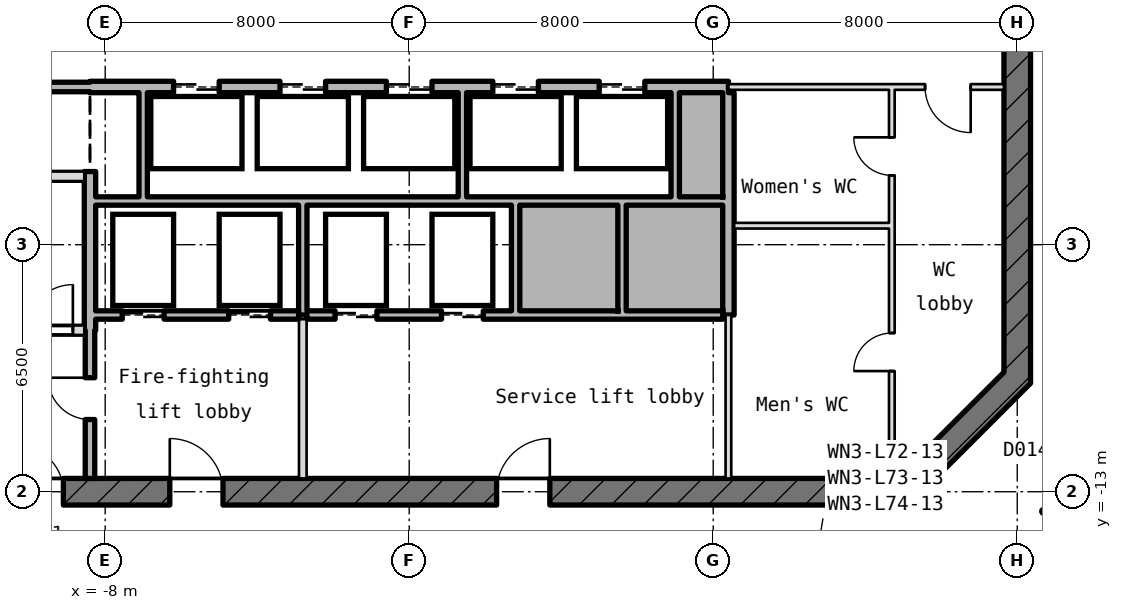
"""IFC4 building model, lengths in metres.
Left out: names, types, materials, properties, quantities, classifications, styles, units other than length and angle.
Written with IfcOpenShell. Run it as: python <this file> out.ifc"""

import sys

from ifc_helpers import new_model, si_unit, direction, frame, frame_2d, origin, place, context, subcontext, project, spatial, rectangle, extrude, element, fill, save


model = new_model("IFC4")
c1 = context("Model", 3, precision=1e-05, world=origin(), true_north=direction((0.0, 1.0)))
c2 = subcontext(c1, "Body", "Model", "MODEL_VIEW")
j1 = project(units=[si_unit("LENGTHUNIT", "METRE"), si_unit("PLANEANGLEUNIT", "RADIAN")], contexts=[c1])
p1 = place(None, origin())
s1 = spatial("IfcSite", under=j1, at=p1, CompositionType="ELEMENT")
p2 = place(p1, origin())
s2 = spatial("IfcBuilding", under=s1, at=p2, CompositionType="ELEMENT")
p3 = place(p2, frame((0.0, 0.0, 321.85)))
s3 = spatial("IfcBuildingStorey", under=s2, at=p3, CompositionType="ELEMENT", Elevation=321.85)
p4 = place(p3, frame((12.897, -13.103, -0.18), z_axis=(0.0, 0.0, 1.0), x_axis=(0.707106781187, 0.707106781187, 0.0)))
e1 = element("IfcWall", 1, at=p4, inside=s3, PredefinedType="SHEAR", context=c2, shape_type="SweptSolid", body=[
    extrude(rectangle(XDim=4.533, YDim=0.7, at=frame_2d((2.266, 0.0))), origin(), (0.0, 0.0, 1.0), 4.15),
])
p5 = place(p3, frame((16.0, -10.145, -0.18), z_axis=(0.0, 0.0, 1.0), x_axis=(0.0, 1.0, 0.0)))
e2 = element("IfcWall", 2, at=p5, inside=s3, PredefinedType="SHEAR", context=c2, shape_type="SweptSolid", body=[
    extrude(rectangle(XDim=20.29, YDim=0.7, at=frame_2d((10.145, 0.0))), origin(), (0.0, 0.0, 1.0), 4.15),
])
p6 = place(p5, frame((8.945, 0.0, 0.18)))
e3 = element("IfcOpeningElement", 3, at=p6, cuts=e2, PredefinedType="OPENING", context=c2, shape_type="SweptSolid", body=[
    extrude(rectangle(XDim=2.4, YDim=2.1, at=frame_2d((1.2, 1.05))), frame((0.0, 0.36, 0.0), z_axis=(0.0, -1.0, 0.0), x_axis=(1.0, 0.0, 0.0)), (0.0, 0.0, 1.0), 0.72),
])
p7 = place(p5, frame((13.545, 0.0, 0.18)))
e4 = element("IfcOpeningElement", 4, at=p7, cuts=e2, PredefinedType="OPENING", context=c2, shape_type="SweptSolid", body=[
    extrude(rectangle(XDim=1.2, YDim=2.1, at=frame_2d((0.6, 1.05))), frame((0.0, 0.36, 0.0), z_axis=(0.0, -1.0, 0.0), x_axis=(1.0, 0.0, 0.0)), (0.0, 0.0, 1.0), 0.72),
])
p8 = place(p3, frame((-13.145, -13.0, -0.18), z_axis=(0.0, 0.0, 1.0), x_axis=(1.0, 0.0, 0.0)))
e5 = element("IfcWall", 5, at=p8, inside=s3, PredefinedType="SHEAR", context=c2, shape_type="SweptSolid", body=[
    extrude(rectangle(XDim=26.29, YDim=0.7, at=frame_2d((13.145, 0.0))), origin(), (0.0, 0.0, 1.0), 4.15),
])
p9 = place(p8, frame((2.845, 0.0, 0.18)))
e6 = element("IfcOpeningElement", 6, at=p9, cuts=e5, PredefinedType="OPENING", context=c2, shape_type="SweptSolid", body=[
    extrude(rectangle(XDim=1.2, YDim=2.1, at=frame_2d((0.6, 1.05))), frame((0.0, 0.36, 0.0), z_axis=(0.0, -1.0, 0.0), x_axis=(1.0, 0.0, 0.0)), (0.0, 0.0, 1.0), 0.72),
])
p10 = place(p8, frame((6.845, 0.0, 0.18)))
e7 = element("IfcOpeningElement", 7, at=p10, cuts=e5, PredefinedType="OPENING", context=c2, shape_type="SweptSolid", body=[
    extrude(rectangle(XDim=1.4, YDim=2.1, at=frame_2d((0.7, 1.05))), frame((0.0, 0.36, 0.0), z_axis=(0.0, -1.0, 0.0), x_axis=(1.0, 0.0, 0.0)), (0.0, 0.0, 1.0), 0.72),
])
p11 = place(p8, frame((15.445, 0.0, 0.18)))
e8 = element("IfcOpeningElement", 8, at=p11, cuts=e5, PredefinedType="OPENING", context=c2, shape_type="SweptSolid", body=[
    extrude(rectangle(XDim=1.4, YDim=2.1, at=frame_2d((0.7, 1.05))), frame((0.0, 0.36, 0.0), z_axis=(0.0, -1.0, 0.0), x_axis=(1.0, 0.0, 0.0)), (0.0, 0.0, 1.0), 0.72),
])
p12 = place(p3, frame((-15.65, -8.75, -0.18), z_axis=(0.0, 0.0, 1.0), x_axis=(1.0, 0.0, 0.0)))
e9 = element("IfcWall", 9, at=p12, inside=s3, PredefinedType="SHEAR", context=c2, shape_type="SweptSolid", body=[
    extrude(rectangle(XDim=7.1, YDim=0.25, at=frame_2d((3.55, 0.0))), origin(), (0.0, 0.0, 1.0), 4.15),
])
p13 = place(p12, frame((5.6, 0.0, 0.18)))
e10 = element("IfcOpeningElement", 10, at=p13, cuts=e9, PredefinedType="OPENING", context=c2, shape_type="SweptSolid", body=[
    extrude(rectangle(XDim=1.2, YDim=2.1, at=frame_2d((0.6, 1.05))), frame((0.0, 0.135, 0.0), z_axis=(0.0, -1.0, 0.0), x_axis=(1.0, 0.0, 0.0)), (0.0, 0.0, 1.0), 0.27),
])
p14 = place(p3, frame((-8.25, -8.35, 0.0), z_axis=(0.0, 0.0, 1.0), x_axis=(1.0, 0.0, 0.0)))
e11 = element("IfcWall", 11, at=p14, inside=s3, PredefinedType="STANDARD", context=c2, shape_type="SweptSolid", body=[
    extrude(rectangle(XDim=5.34, YDim=0.22, at=frame_2d((2.67, 0.0))), origin(), (0.0, 0.0, 1.0), 3.97),
])
p15 = place(p14, frame((0.7, 0.0, 0.0)))
e12 = element("IfcOpeningElement", 12, at=p15, cuts=e11, PredefinedType="OPENING", context=c2, shape_type="SweptSolid", body=[
    extrude(rectangle(XDim=1.1, YDim=2.1, at=frame_2d((0.55, 1.05))), frame((0.0, 0.12, 0.0), z_axis=(0.0, -1.0, 0.0), x_axis=(1.0, 0.0, 0.0)), (0.0, 0.0, 1.0), 0.24),
])
p16 = place(p14, frame((3.5, 0.0, 0.0)))
e13 = element("IfcOpeningElement", 13, at=p16, cuts=e11, PredefinedType="OPENING", context=c2, shape_type="SweptSolid", body=[
    extrude(rectangle(XDim=1.1, YDim=2.1, at=frame_2d((0.55, 1.05))), frame((0.0, 0.12, 0.0), z_axis=(0.0, -1.0, 0.0), x_axis=(1.0, 0.0, 0.0)), (0.0, 0.0, 1.0), 0.24),
])
p17 = place(p3, frame((-2.69, -8.35, 0.0), z_axis=(0.0, 0.0, 1.0), x_axis=(1.0, 0.0, 0.0)))
e14 = element("IfcWall", 14, at=p17, inside=s3, PredefinedType="STANDARD", context=c2, shape_type="SweptSolid", body=[
    extrude(rectangle(XDim=10.94, YDim=0.22, at=frame_2d((5.47, 0.0))), origin(), (0.0, 0.0, 1.0), 3.97),
])
p18 = place(p17, frame((0.74, 0.0, 0.0)))
e15 = element("IfcOpeningElement", 15, at=p18, cuts=e14, PredefinedType="OPENING", context=c2, shape_type="SweptSolid", body=[
    extrude(rectangle(XDim=1.1, YDim=2.1, at=frame_2d((0.55, 1.05))), frame((0.0, 0.12, 0.0), z_axis=(0.0, -1.0, 0.0), x_axis=(1.0, 0.0, 0.0)), (0.0, 0.0, 1.0), 0.24),
])
p19 = place(p17, frame((3.54, 0.0, 0.0)))
e16 = element("IfcOpeningElement", 16, at=p19, cuts=e14, PredefinedType="OPENING", context=c2, shape_type="SweptSolid", body=[
    extrude(rectangle(XDim=1.1, YDim=2.1, at=frame_2d((0.55, 1.05))), frame((0.0, 0.12, 0.0), z_axis=(0.0, -1.0, 0.0), x_axis=(1.0, 0.0, 0.0)), (0.0, 0.0, 1.0), 0.24),
])
p20 = place(p3, frame((8.55, -6.0, 0.0), z_axis=(0.0, 0.0, 1.0), x_axis=(1.0, 0.0, 0.0)))
e17 = element("IfcWall", 17, at=p20, inside=s3, PredefinedType="PARTITIONING", context=c2, shape_type="SweptSolid", body=[
    extrude(rectangle(XDim=4.075, YDim=0.15, at=frame_2d((2.038, 0.0))), origin(), (0.0, 0.0, 1.0), 3.97),
])
p21 = place(p3, frame((-8.25, -5.35, 0.0), z_axis=(0.0, 0.0, 1.0), x_axis=(1.0, 0.0, 0.0)))
e18 = element("IfcWall", 18, at=p21, inside=s3, PredefinedType="STANDARD", context=c2, shape_type="SweptSolid", body=[
    extrude(rectangle(XDim=16.5, YDim=0.22, at=frame_2d((8.25, 0.0))), origin(), (0.0, 0.0, 1.0), 3.97),
])
p22 = place(p3, frame((-15.65, -4.7, -0.18), z_axis=(0.0, 0.0, 1.0), x_axis=(1.0, 0.0, 0.0)))
e19 = element("IfcWall", 19, at=p22, inside=s3, PredefinedType="SHEAR", context=c2, shape_type="SweptSolid", body=[
    extrude(rectangle(XDim=7.1, YDim=0.25, at=frame_2d((3.55, 0.0))), origin(), (0.0, 0.0, 1.0), 4.15),
])
p23 = place(p3, frame((-15.65, -2.35, 0.0), z_axis=(0.0, 0.0, 1.0), x_axis=(1.0, 0.0, 0.0)))
e20 = element("IfcWall", 20, at=p23, inside=s3, PredefinedType="STANDARD", context=c2, shape_type="SweptSolid", body=[
    extrude(rectangle(XDim=7.25, YDim=0.25, at=frame_2d((3.625, 0.0))), origin(), (0.0, 0.0, 1.0), 3.97),
])
p24 = place(p3, frame((-8.4, -2.35, -0.18), z_axis=(0.0, 0.0, 1.0), x_axis=(1.0, 0.0, 0.0)))
e21 = element("IfcWall", 21, at=p24, inside=s3, PredefinedType="SHEAR", context=c2, shape_type="SweptSolid", body=[
    extrude(rectangle(XDim=16.8, YDim=0.3, at=frame_2d((8.4, 0.0))), origin(), (0.0, 0.0, 1.0), 4.15),
])
p25 = place(p24, frame((2.2, 0.0, 0.18)))
e22 = element("IfcOpeningElement", 22, at=p25, cuts=e21, PredefinedType="OPENING", context=c2, shape_type="SweptSolid", body=[
    extrude(rectangle(XDim=1.2, YDim=2.1, at=frame_2d((0.6, 1.05))), frame((0.0, 0.16, 0.0), z_axis=(0.0, -1.0, 0.0), x_axis=(1.0, 0.0, 0.0)), (0.0, 0.0, 1.0), 0.32),
])
p26 = place(p24, frame((5.0, 0.0, 0.18)))
e23 = element("IfcOpeningElement", 23, at=p26, cuts=e21, PredefinedType="OPENING", context=c2, shape_type="SweptSolid", body=[
    extrude(rectangle(XDim=1.2, YDim=2.1, at=frame_2d((0.6, 1.05))), frame((0.0, 0.16, 0.0), z_axis=(0.0, -1.0, 0.0), x_axis=(1.0, 0.0, 0.0)), (0.0, 0.0, 1.0), 0.32),
])
p27 = place(p24, frame((7.8, 0.0, 0.18)))
e24 = element("IfcOpeningElement", 24, at=p27, cuts=e21, PredefinedType="OPENING", context=c2, shape_type="SweptSolid", body=[
    extrude(rectangle(XDim=1.2, YDim=2.1, at=frame_2d((0.6, 1.05))), frame((0.0, 0.16, 0.0), z_axis=(0.0, -1.0, 0.0), x_axis=(1.0, 0.0, 0.0)), (0.0, 0.0, 1.0), 0.32),
])
p28 = place(p24, frame((10.6, 0.0, 0.18)))
e25 = element("IfcOpeningElement", 25, at=p28, cuts=e21, PredefinedType="OPENING", context=c2, shape_type="SweptSolid", body=[
    extrude(rectangle(XDim=1.2, YDim=2.1, at=frame_2d((0.6, 1.05))), frame((0.0, 0.16, 0.0), z_axis=(0.0, -1.0, 0.0), x_axis=(1.0, 0.0, 0.0)), (0.0, 0.0, 1.0), 0.32),
])
p29 = place(p24, frame((13.4, 0.0, 0.18)))
e26 = element("IfcOpeningElement", 26, at=p29, cuts=e21, PredefinedType="OPENING", context=c2, shape_type="SweptSolid", body=[
    extrude(rectangle(XDim=1.2, YDim=2.1, at=frame_2d((0.6, 1.05))), frame((0.0, 0.16, 0.0), z_axis=(0.0, -1.0, 0.0), x_axis=(1.0, 0.0, 0.0)), (0.0, 0.0, 1.0), 0.32),
])
p30 = place(p3, frame((8.4, -2.35, 0.0), z_axis=(0.0, 0.0, 1.0), x_axis=(1.0, 0.0, 0.0)))
e27 = element("IfcWall", 27, at=p30, inside=s3, PredefinedType="PARTITIONING", context=c2, shape_type="SweptSolid", body=[
    extrude(rectangle(XDim=7.25, YDim=0.15, at=frame_2d((3.625, 0.0))), origin(), (0.0, 0.0, 1.0), 3.97),
])
p31 = place(p30, frame((5.175, 0.0, 0.0)))
e28 = element("IfcOpeningElement", 28, at=p31, cuts=e27, PredefinedType="OPENING", context=c2, shape_type="SweptSolid", body=[
    extrude(rectangle(XDim=1.2, YDim=2.1, at=frame_2d((0.6, 1.05))), frame((0.0, 0.085, 0.0), z_axis=(0.0, -1.0, 0.0), x_axis=(1.0, 0.0, 0.0)), (0.0, 0.0, 1.0), 0.17),
])
p32 = place(p3, frame((-8.4, -12.65, 0.0), z_axis=(0.0, 0.0, 1.0), x_axis=(0.0, 1.0, 0.0)))
e29 = element("IfcWall", 29, at=p32, inside=s3, PredefinedType="STANDARD", context=c2, shape_type="SweptSolid", body=[
    extrude(rectangle(XDim=3.9, YDim=0.25, at=frame_2d((1.95, 0.0))), origin(), (0.0, 0.0, 1.0), 3.97),
])
p33 = place(p32, frame((1.55, 0.0, 0.0)))
e30 = element("IfcOpeningElement", 30, at=p33, cuts=e29, PredefinedType="OPENING", context=c2, shape_type="SweptSolid", body=[
    extrude(rectangle(XDim=1.1, YDim=2.1, at=frame_2d((0.55, 1.05))), frame((0.0, 0.135, 0.0), z_axis=(0.0, -1.0, 0.0), x_axis=(1.0, 0.0, 0.0)), (0.0, 0.0, 1.0), 0.27),
])
p34 = place(p3, frame((-8.4, -8.75, -0.18), z_axis=(0.0, 0.0, 1.0), x_axis=(0.0, 1.0, 0.0)))
e31 = element("IfcWall", 31, at=p34, inside=s3, PredefinedType="SHEAR", context=c2, shape_type="SweptSolid", body=[
    extrude(rectangle(XDim=4.175, YDim=0.3, at=frame_2d((2.087, 0.0))), origin(), (0.0, 0.0, 1.0), 4.15),
])
p35 = place(p3, frame((-7.0, -5.24, 0.0), z_axis=(0.0, 0.0, 1.0), x_axis=(0.0, 1.0, 0.0)))
e32 = element("IfcWall", 32, at=p35, inside=s3, PredefinedType="STANDARD", context=c2, shape_type="SweptSolid", body=[
    extrude(rectangle(XDim=2.74, YDim=0.22, at=frame_2d((1.37, 0.0))), origin(), (0.0, 0.0, 1.0), 3.97),
])
p36 = place(p3, frame((-2.8, -12.65, 0.0), z_axis=(0.0, 0.0, 1.0), x_axis=(0.0, 1.0, 0.0)))
e33 = element("IfcWall", 33, at=p36, inside=s3, PredefinedType="PARTITIONING", context=c2, shape_type="SweptSolid", body=[
    extrude(rectangle(XDim=4.19, YDim=0.2, at=frame_2d((2.095, 0.0))), origin(), (0.0, 0.0, 1.0), 3.97),
])
p37 = place(p3, frame((-2.8, -8.35, 0.0), z_axis=(0.0, 0.0, 1.0), x_axis=(0.0, 1.0, 0.0)))
e34 = element("IfcWall", 34, at=p37, inside=s3, PredefinedType="STANDARD", context=c2, shape_type="SweptSolid", body=[
    extrude(rectangle(XDim=2.89, YDim=0.22, at=frame_2d((1.445, 0.0))), origin(), (0.0, 0.0, 1.0), 3.97),
])
p38 = place(p3, frame((1.4, -5.24, 0.0), z_axis=(0.0, 0.0, 1.0), x_axis=(0.0, 1.0, 0.0)))
e35 = element("IfcWall", 35, at=p38, inside=s3, PredefinedType="STANDARD", context=c2, shape_type="SweptSolid", body=[
    extrude(rectangle(XDim=2.74, YDim=0.22, at=frame_2d((1.37, 0.0))), origin(), (0.0, 0.0, 1.0), 3.97),
])
for number, where, z_axis, x_axis in (
    (36, (2.8, -8.24, 0.0), (0.0, 0.0, 1.0), (0.0, 1.0, 0.0)),
    (37, (5.6, -8.24, 0.0), (0.0, 0.0, 1.0), (0.0, 1.0, 0.0)),
):
    element("IfcWall", number, at=place(p3, frame(where, z_axis=z_axis, x_axis=x_axis)), inside=s3, PredefinedType="STANDARD", context=c2, shape_type="SweptSolid", body=[
        extrude(rectangle(XDim=2.78, YDim=0.22, at=frame_2d((1.39, 0.0))), origin(), (0.0, 0.0, 1.0), 3.97),
    ])
p39 = place(p3, frame((7.0, -5.24, 0.0), z_axis=(0.0, 0.0, 1.0), x_axis=(0.0, 1.0, 0.0)))
e38 = element("IfcWall", 38, at=p39, inside=s3, PredefinedType="STANDARD", context=c2, shape_type="SweptSolid", body=[
    extrude(rectangle(XDim=2.74, YDim=0.22, at=frame_2d((1.37, 0.0))), origin(), (0.0, 0.0, 1.0), 3.97),
])
p40 = place(p3, frame((8.4, -12.65, 0.0), z_axis=(0.0, 0.0, 1.0), x_axis=(0.0, 1.0, 0.0)))
e39 = element("IfcWall", 39, at=p40, inside=s3, PredefinedType="PARTITIONING", context=c2, shape_type="SweptSolid", body=[
    extrude(rectangle(XDim=4.3, YDim=0.15, at=frame_2d((2.15, 0.0))), origin(), (0.0, 0.0, 1.0), 3.97),
])
p41 = place(p3, frame((8.4, -8.35, -0.18), z_axis=(0.0, 0.0, 1.0), x_axis=(0.0, 1.0, 0.0)))
e40 = element("IfcWall", 40, at=p41, inside=s3, PredefinedType="SHEAR", context=c2, shape_type="SweptSolid", body=[
    extrude(rectangle(XDim=5.85, YDim=0.3, at=frame_2d((2.925, 0.0))), origin(), (0.0, 0.0, 1.0), 4.15),
])
p42 = place(p3, frame((12.7, -12.65, 0.0), z_axis=(0.0, 0.0, 1.0), x_axis=(0.0, 1.0, 0.0)))
e41 = element("IfcWall", 41, at=p42, inside=s3, PredefinedType="PARTITIONING", context=c2, shape_type="SweptSolid", body=[
    extrude(rectangle(XDim=10.225, YDim=0.15, at=frame_2d((5.112, 0.0))), origin(), (0.0, 0.0, 1.0), 3.97),
])
p43 = place(p42, frame((7.975, 0.0, 0.0)))
e42 = element("IfcOpeningElement", 42, at=p43, cuts=e41, PredefinedType="OPENING", context=c2, shape_type="SweptSolid", body=[
    extrude(rectangle(XDim=1.0, YDim=2.1, at=frame_2d((0.5, 1.05))), frame((0.0, 0.085, 0.0), z_axis=(0.0, -1.0, 0.0), x_axis=(1.0, 0.0, 0.0)), (0.0, 0.0, 1.0), 0.17),
])
p44 = place(p42, frame((2.825, 0.0, 0.0)))
e43 = element("IfcOpeningElement", 43, at=p44, cuts=e41, PredefinedType="OPENING", context=c2, shape_type="SweptSolid", body=[
    extrude(rectangle(XDim=1.0, YDim=2.1, at=frame_2d((0.5, 1.05))), frame((0.0, 0.085, 0.0), z_axis=(0.0, -1.0, 0.0), x_axis=(1.0, 0.0, 0.0)), (0.0, 0.0, 1.0), 0.17),
])
p45 = place(p3, frame((19.05, -11.263, 0.0), z_axis=(0.0, 0.0, 1.0), x_axis=(-0.722587616722, -0.691279347414, 0.0)))
e44 = element("IfcWall", 44, at=p45, inside=s3, PredefinedType="PARTITIONING", context=c2, shape_type="SweptSolid", body=[
    extrude(rectangle(XDim=6.745, YDim=0.15, at=frame_2d((3.373, 0.0))), origin(), (0.0, 0.0, 1.0), 3.97),
])
p46 = place(p45, frame((2.36, 0.0, 0.0)))
e45 = element("IfcOpeningElement", 45, at=p46, cuts=e44, PredefinedType="OPENING", context=c2, shape_type="SweptSolid", body=[
    extrude(rectangle(XDim=1.8, YDim=2.1, at=frame_2d((0.9, 1.05))), frame((0.0, 0.085, 0.0), z_axis=(0.0, -1.0, 0.0), x_axis=(1.0, 0.0, 0.0)), (0.0, 0.0, 1.0), 0.17),
])
p47 = place(p25, origin())
e46 = element("IfcDoor", 46, at=p47, inside=s3, OperationType="DOUBLE_DOOR_SLIDING", PredefinedType="DOOR", context=c2, shape_type="SweptSolid", body=[
    extrude(rectangle(XDim=1.2, YDim=2.1, at=frame_2d((0.6, 1.05))), frame((0.0, 0.025, 0.0), z_axis=(0.0, -1.0, 0.0), x_axis=(1.0, 0.0, 0.0)), (0.0, 0.0, 1.0), 0.05),
])
fill(e22, e46)
p48 = place(p26, origin())
e47 = element("IfcDoor", 47, at=p48, inside=s3, OperationType="DOUBLE_DOOR_SLIDING", PredefinedType="DOOR", context=c2, shape_type="SweptSolid", body=[
    extrude(rectangle(XDim=1.2, YDim=2.1, at=frame_2d((0.6, 1.05))), frame((0.0, 0.025, 0.0), z_axis=(0.0, -1.0, 0.0), x_axis=(1.0, 0.0, 0.0)), (0.0, 0.0, 1.0), 0.05),
])
fill(e23, e47)
p49 = place(p27, origin())
e48 = element("IfcDoor", 48, at=p49, inside=s3, OperationType="DOUBLE_DOOR_SLIDING", PredefinedType="DOOR", context=c2, shape_type="SweptSolid", body=[
    extrude(rectangle(XDim=1.2, YDim=2.1, at=frame_2d((0.6, 1.05))), frame((0.0, 0.025, 0.0), z_axis=(0.0, -1.0, 0.0), x_axis=(1.0, 0.0, 0.0)), (0.0, 0.0, 1.0), 0.05),
])
fill(e24, e48)
p50 = place(p28, origin())
e49 = element("IfcDoor", 49, at=p50, inside=s3, OperationType="DOUBLE_DOOR_SLIDING", PredefinedType="DOOR", context=c2, shape_type="SweptSolid", body=[
    extrude(rectangle(XDim=1.2, YDim=2.1, at=frame_2d((0.6, 1.05))), frame((0.0, 0.025, 0.0), z_axis=(0.0, -1.0, 0.0), x_axis=(1.0, 0.0, 0.0)), (0.0, 0.0, 1.0), 0.05),
])
fill(e25, e49)
p51 = place(p29, origin())
e50 = element("IfcDoor", 50, at=p51, inside=s3, OperationType="DOUBLE_DOOR_SLIDING", PredefinedType="DOOR", context=c2, shape_type="SweptSolid", body=[
    extrude(rectangle(XDim=1.2, YDim=2.1, at=frame_2d((0.6, 1.05))), frame((0.0, 0.025, 0.0), z_axis=(0.0, -1.0, 0.0), x_axis=(1.0, 0.0, 0.0)), (0.0, 0.0, 1.0), 0.05),
])
fill(e26, e50)
p52 = place(p15, origin())
e51 = element("IfcDoor", 51, at=p52, inside=s3, OperationType="DOUBLE_DOOR_SLIDING", PredefinedType="DOOR", context=c2, shape_type="SweptSolid", body=[
    extrude(rectangle(XDim=1.1, YDim=2.1, at=frame_2d((0.55, 1.05))), frame((0.0, 0.025, 0.0), z_axis=(0.0, -1.0, 0.0), x_axis=(1.0, 0.0, 0.0)), (0.0, 0.0, 1.0), 0.05),
])
fill(e12, e51)
p53 = place(p16, origin())
e52 = element("IfcDoor", 52, at=p53, inside=s3, OperationType="DOUBLE_DOOR_SLIDING", PredefinedType="DOOR", context=c2, shape_type="SweptSolid", body=[
    extrude(rectangle(XDim=1.1, YDim=2.1, at=frame_2d((0.55, 1.05))), frame((0.0, 0.025, 0.0), z_axis=(0.0, -1.0, 0.0), x_axis=(1.0, 0.0, 0.0)), (0.0, 0.0, 1.0), 0.05),
])
fill(e13, e52)
p54 = place(p18, origin())
e53 = element("IfcDoor", 53, at=p54, inside=s3, OperationType="DOUBLE_DOOR_SLIDING", PredefinedType="DOOR", context=c2, shape_type="SweptSolid", body=[
    extrude(rectangle(XDim=1.1, YDim=2.1, at=frame_2d((0.55, 1.05))), frame((0.0, 0.025, 0.0), z_axis=(0.0, -1.0, 0.0), x_axis=(1.0, 0.0, 0.0)), (0.0, 0.0, 1.0), 0.05),
])
fill(e15, e53)
p55 = place(p19, origin())
e54 = element("IfcDoor", 54, at=p55, inside=s3, OperationType="DOUBLE_DOOR_SLIDING", PredefinedType="DOOR", context=c2, shape_type="SweptSolid", body=[
    extrude(rectangle(XDim=1.1, YDim=2.1, at=frame_2d((0.55, 1.05))), frame((0.0, 0.025, 0.0), z_axis=(0.0, -1.0, 0.0), x_axis=(1.0, 0.0, 0.0)), (0.0, 0.0, 1.0), 0.05),
])
fill(e16, e54)
p56 = place(p13, origin())
e55 = element("IfcDoor", 55, at=p56, inside=s3, OperationType="SINGLE_SWING_RIGHT", PredefinedType="DOOR", context=c2, shape_type="SweptSolid", body=[
    extrude(rectangle(XDim=1.2, YDim=2.1, at=frame_2d((0.6, 1.05))), frame((0.0, 0.025, 0.0), z_axis=(0.0, -1.0, 0.0), x_axis=(1.0, 0.0, 0.0)), (0.0, 0.0, 1.0), 0.05),
])
fill(e10, e55)
p57 = place(p33, origin())
e56 = element("IfcDoor", 56, at=p57, inside=s3, OperationType="SINGLE_SWING_RIGHT", PredefinedType="DOOR", context=c2, shape_type="SweptSolid", body=[
    extrude(rectangle(XDim=1.1, YDim=2.1, at=frame_2d((0.55, 1.05))), frame((0.0, 0.025, 0.0), z_axis=(0.0, -1.0, 0.0), x_axis=(1.0, 0.0, 0.0)), (0.0, 0.0, 1.0), 0.05),
])
fill(e30, e56)
p58 = place(p9, origin())
e57 = element("IfcDoor", 57, at=p58, inside=s3, OperationType="SINGLE_SWING_RIGHT", PredefinedType="DOOR", context=c2, shape_type="SweptSolid", body=[
    extrude(rectangle(XDim=1.2, YDim=2.1, at=frame_2d((0.6, 1.05))), frame((0.0, 0.025, 0.0), z_axis=(0.0, -1.0, 0.0), x_axis=(1.0, 0.0, 0.0)), (0.0, 0.0, 1.0), 0.05),
])
fill(e6, e57)
p59 = place(p10, origin())
e58 = element("IfcDoor", 58, at=p59, inside=s3, OperationType="SINGLE_SWING_RIGHT", PredefinedType="DOOR", context=c2, shape_type="SweptSolid", body=[
    extrude(rectangle(XDim=1.4, YDim=2.1, at=frame_2d((0.7, 1.05))), frame((0.0, 0.025, 0.0), z_axis=(0.0, -1.0, 0.0), x_axis=(1.0, 0.0, 0.0)), (0.0, 0.0, 1.0), 0.05),
])
fill(e7, e58)
p60 = place(p11, origin())
e59 = element("IfcDoor", 59, at=p60, inside=s3, OperationType="SINGLE_SWING_RIGHT", PredefinedType="DOOR", context=c2, shape_type="SweptSolid", body=[
    extrude(rectangle(XDim=1.4, YDim=2.1, at=frame_2d((0.7, 1.05))), frame((0.0, 0.025, 0.0), z_axis=(0.0, -1.0, 0.0), x_axis=(1.0, 0.0, 0.0)), (0.0, 0.0, 1.0), 0.05),
])
fill(e8, e59)
p61 = place(p31, frame((1.2, 0.0, 0.0), z_axis=(0.0, 0.0, 1.0), x_axis=(-1.0, 0.0, 0.0)))
e60 = element("IfcDoor", 60, at=p61, inside=s3, OperationType="SINGLE_SWING_LEFT", PredefinedType="DOOR", context=c2, shape_type="SweptSolid", body=[
    extrude(rectangle(XDim=1.2, YDim=2.1, at=frame_2d((0.6, 1.05))), frame((0.0, 0.025, 0.0), z_axis=(0.0, -1.0, 0.0), x_axis=(1.0, 0.0, 0.0)), (0.0, 0.0, 1.0), 0.05),
])
fill(e28, e60)
p62 = place(p43, origin())
e61 = element("IfcDoor", 61, at=p62, inside=s3, OperationType="SINGLE_SWING_RIGHT", PredefinedType="DOOR", context=c2, shape_type="SweptSolid", body=[
    extrude(rectangle(XDim=1.0, YDim=2.1, at=frame_2d((0.5, 1.05))), frame((0.0, 0.025, 0.0), z_axis=(0.0, -1.0, 0.0), x_axis=(1.0, 0.0, 0.0)), (0.0, 0.0, 1.0), 0.05),
])
fill(e42, e61)
p63 = place(p44, origin())
e62 = element("IfcDoor", 62, at=p63, inside=s3, OperationType="SINGLE_SWING_RIGHT", PredefinedType="DOOR", context=c2, shape_type="SweptSolid", body=[
    extrude(rectangle(XDim=1.0, YDim=2.1, at=frame_2d((0.5, 1.05))), frame((0.0, 0.025, 0.0), z_axis=(0.0, -1.0, 0.0), x_axis=(1.0, 0.0, 0.0)), (0.0, 0.0, 1.0), 0.05),
])
fill(e43, e62)
p64 = place(p46, origin())
e63 = element("IfcDoor", 63, at=p64, inside=s3, OperationType="DOUBLE_DOOR_SINGLE_SWING", PredefinedType="DOOR", context=c2, shape_type="SweptSolid", body=[
    extrude(rectangle(XDim=1.8, YDim=2.1, at=frame_2d((0.9, 1.05))), frame((0.0, 0.025, 0.0), z_axis=(0.0, -1.0, 0.0), x_axis=(1.0, 0.0, 0.0)), (0.0, 0.0, 1.0), 0.05),
])
fill(e45, e63)
save(model, sys.argv[1])
